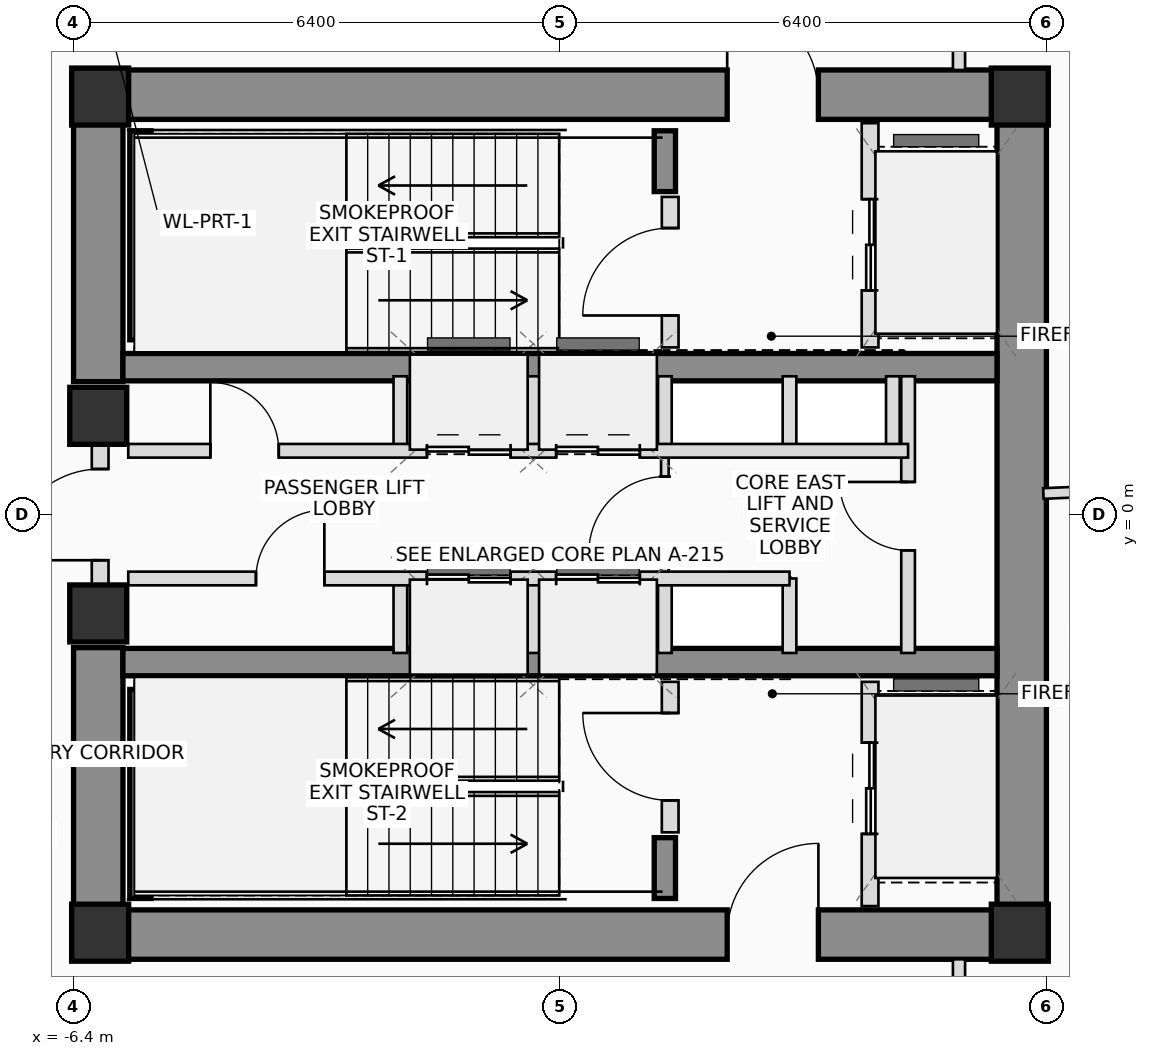
"""IFC4 building model, lengths in metres.
Left out: names, types, materials, properties, quantities, classifications, styles, units other than length and angle.
Written with IfcOpenShell. Run it as: python <this file> out.ifc"""

import sys

from ifc_helpers import new_model, si_unit, direction, frame, frame_2d, origin, origin_2d, place, context, subcontext, project, spatial, rectangle, extrude, source, transform, mapped, element, fill, save


model = new_model("IFC4")
c1 = context("Model", 3, precision=1e-05, world=origin(), true_north=direction((0.0, 1.0)))
c2 = subcontext(c1, "Body", "Model", "MODEL_VIEW")
j1 = project(units=[si_unit("LENGTHUNIT", "METRE"), si_unit("PLANEANGLEUNIT", "RADIAN")], contexts=[c1])
p1 = place(None, origin())
s1 = spatial("IfcSite", under=j1, at=p1, CompositionType="ELEMENT")
p2 = place(p1, origin())
s2 = spatial("IfcBuilding", under=s1, at=p2, CompositionType="ELEMENT")
p3 = place(p2, frame((0.0, 0.0, 162.2)))
s3 = spatial("IfcBuildingStorey", under=s2, at=p3, CompositionType="ELEMENT", Elevation=162.2)
m1 = source(origin(), c2, "Body", "SweptSolid", [
    extrude(rectangle(XDim=0.75, YDim=0.75, at=origin_2d()), origin(), (0.0, 0.0, 1.0), 3.45),
])
for number, where, z_axis, x_axis in (
    (1, (-6.05, -5.5, 0.0), (0.0, 0.0, 1.0), (1.0, 0.0, 0.0)),
    (2, (6.05, -5.5, 0.0), (0.0, 0.0, 1.0), (1.0, 0.0, 0.0)),
    (3, (6.05, 5.5, 0.0), (0.0, 0.0, 1.0), (1.0, 0.0, 0.0)),
    (4, (-6.05, 5.5, 0.0), (0.0, 0.0, 1.0), (1.0, 0.0, 0.0)),
):
    element("IfcColumn", number, at=place(p3, frame(where, z_axis=z_axis, x_axis=x_axis)), inside=s3, PredefinedType="COLUMN", context=c2, shape_type="MappedRepresentation", body=[
        mapped(m1, transform((0.0, 0.0, 0.0), scale=1.0)),
    ])
p4 = place(p3, frame((-6.4, 5.525, 0.0), z_axis=(0.0, 0.0, 1.0), x_axis=(1.0, 0.0, 0.0)))
e5 = element("IfcWall", 5, at=p4, inside=s3, PredefinedType="SHEAR", context=c2, shape_type="SweptSolid", body=[
    extrude(rectangle(XDim=12.8, YDim=0.65, at=frame_2d((6.4, 0.0))), origin(), (0.0, 0.0, 1.0), 3.45),
])
p5 = place(p4, frame((8.6, 0.0, 0.0)))
e6 = element("IfcOpeningElement", 6, at=p5, cuts=e5, PredefinedType="OPENING", context=c2, shape_type="SweptSolid", body=[
    extrude(rectangle(XDim=1.2, YDim=2.2, at=frame_2d((0.6, 1.1))), frame((0.0, 0.335, 0.0), z_axis=(0.0, -1.0, 0.0), x_axis=(1.0, 0.0, 0.0)), (0.0, 0.0, 1.0), 0.67),
])
p6 = place(p3, frame((-6.4, -5.525, 0.0), z_axis=(0.0, 0.0, 1.0), x_axis=(1.0, 0.0, 0.0)))
e7 = element("IfcWall", 7, at=p6, inside=s3, PredefinedType="SHEAR", context=c2, shape_type="SweptSolid", body=[
    extrude(rectangle(XDim=12.8, YDim=0.65, at=frame_2d((6.4, 0.0))), origin(), (0.0, 0.0, 1.0), 3.45),
])
p7 = place(p6, frame((8.6, 0.0, 0.0)))
e8 = element("IfcOpeningElement", 8, at=p7, cuts=e7, PredefinedType="OPENING", context=c2, shape_type="SweptSolid", body=[
    extrude(rectangle(XDim=1.2, YDim=2.2, at=frame_2d((0.6, 1.1))), frame((0.0, 0.335, 0.0), z_axis=(0.0, -1.0, 0.0), x_axis=(1.0, 0.0, 0.0)), (0.0, 0.0, 1.0), 0.67),
])
p8 = place(p3, frame((6.075, -5.2, 0.0), z_axis=(0.0, 0.0, 1.0), x_axis=(0.0, 1.0, 0.0)))
e9 = element("IfcWall", 9, at=p8, inside=s3, PredefinedType="SHEAR", context=c2, shape_type="SweptSolid", body=[
    extrude(rectangle(XDim=10.4, YDim=0.65, at=frame_2d((5.2, 0.0))), origin(), (0.0, 0.0, 1.0), 3.45),
])
for number, where, z_axis, x_axis in (
    (10, (-6.075, -5.2, 0.0), (0.0, 0.0, 1.0), (0.0, 1.0, 0.0)),
    (11, (-6.075, 1.75, 0.0), (0.0, 0.0, 1.0), (0.0, 1.0, 0.0)),
):
    element("IfcWall", number, at=place(p3, frame(where, z_axis=z_axis, x_axis=x_axis)), inside=s3, PredefinedType="SHEAR", context=c2, shape_type="SweptSolid", body=[
        extrude(rectangle(XDim=3.45, YDim=0.65, at=frame_2d((1.725, 0.0))), origin(), (0.0, 0.0, 1.0), 3.45),
    ])
for number, where, z_axis, x_axis in (
    (12, (-5.75, 1.94, 0.0), (0.0, 0.0, 1.0), (1.0, 0.0, 0.0)),
    (13, (-5.75, -1.94, 0.0), (0.0, 0.0, 1.0), (1.0, 0.0, 0.0)),
):
    element("IfcWall", number, at=place(p3, frame(where, z_axis=z_axis, x_axis=x_axis)), inside=s3, PredefinedType="SHEAR", context=c2, shape_type="SweptSolid", body=[
        extrude(rectangle(XDim=11.5, YDim=0.36, at=frame_2d((5.75, 0.0))), origin(), (0.0, 0.0, 1.0), 3.45),
    ])
p9 = place(p3, frame((-5.52, 2.3, 0.0), z_axis=(0.0, 0.0, 1.0), x_axis=(0.0, 1.0, 0.0)))
e14 = element("IfcWall", 14, at=p9, inside=s3, PredefinedType="SHEAR", context=c2, shape_type="SweptSolid", body=[
    extrude(rectangle(XDim=2.75, YDim=0.28, at=frame_2d((1.375, 0.0))), origin(), (0.0, 0.0, 1.0), 3.45),
])
p10 = place(p3, frame((1.38, 4.25, 0.0), z_axis=(0.0, 0.0, 1.0), x_axis=(0.0, 1.0, 0.0)))
e15 = element("IfcWall", 15, at=p10, inside=s3, PredefinedType="SHEAR", context=c2, shape_type="SweptSolid", body=[
    extrude(rectangle(XDim=0.8, YDim=0.28, at=frame_2d((0.4, 0.0))), origin(), (0.0, 0.0, 1.0), 3.45),
])
p11 = place(p3, frame((-5.52, -5.05, 0.0), z_axis=(0.0, 0.0, 1.0), x_axis=(0.0, 1.0, 0.0)))
e16 = element("IfcWall", 16, at=p11, inside=s3, PredefinedType="SHEAR", context=c2, shape_type="SweptSolid", body=[
    extrude(rectangle(XDim=2.75, YDim=0.28, at=frame_2d((1.375, 0.0))), origin(), (0.0, 0.0, 1.0), 3.45),
])
p12 = place(p3, frame((1.38, -5.05, 0.0), z_axis=(0.0, 0.0, 1.0), x_axis=(0.0, 1.0, 0.0)))
e17 = element("IfcWall", 17, at=p12, inside=s3, PredefinedType="SHEAR", context=c2, shape_type="SweptSolid", body=[
    extrude(rectangle(XDim=0.8, YDim=0.28, at=frame_2d((0.4, 0.0))), origin(), (0.0, 0.0, 1.0), 3.45),
])
for number, where, z_axis, x_axis in (
    (18, (-6.075, -1.3, 0.0), (0.0, 0.0, 1.0), (1.0, 0.0, 0.0)),
    (19, (-6.075, 1.3, 0.0), (0.0, 0.0, 1.0), (1.0, 0.0, 0.0)),
):
    element("IfcColumn", number, at=place(p3, frame(where, z_axis=z_axis, x_axis=x_axis)), inside=s3, PredefinedType="COLUMN", context=c2, shape_type="MappedRepresentation", body=[
        mapped(m1, transform((0.0, 0.0, 0.0), scale=1.0)),
    ])
p13 = place(p3, frame((-6.05, -0.95, 0.0), z_axis=(0.0, 0.0, 1.0), x_axis=(0.0, 1.0, 0.0)))
e20 = element("IfcWall", 20, at=p13, inside=s3, PredefinedType="PLUMBINGWALL", context=c2, shape_type="SweptSolid", body=[
    extrude(rectangle(XDim=1.9, YDim=0.22, at=frame_2d((0.95, 0.0))), origin(), (0.0, 0.0, 1.0), 2.23),
])
p14 = place(p13, frame((0.35, 0.0, 0.0)))
e21 = element("IfcOpeningElement", 21, at=p14, cuts=e20, PredefinedType="OPENING", context=c2, shape_type="SweptSolid", body=[
    extrude(rectangle(XDim=1.2, YDim=2.2, at=frame_2d((0.6, 1.1))), frame((0.0, 0.12, 0.0), z_axis=(0.0, -1.0, 0.0), x_axis=(1.0, 0.0, 0.0)), (0.0, 0.0, 1.0), 0.24),
])
p15 = place(p3, frame((1.45, 2.2, 0.0), z_axis=(0.0, 0.0, 1.0), x_axis=(0.0, 1.0, 0.0)))
e22 = element("IfcWall", 22, at=p15, inside=s3, PredefinedType="PLUMBINGWALL", context=c2, shape_type="SweptSolid", body=[
    extrude(rectangle(XDim=1.98, YDim=0.22, at=frame_2d((0.99, 0.0))), origin(), (0.0, 0.0, 1.0), 3.25),
])
p16 = place(p15, frame((0.42, 0.0, 0.0)))
e23 = element("IfcOpeningElement", 23, at=p16, cuts=e22, PredefinedType="OPENING", context=c2, shape_type="SweptSolid", body=[
    extrude(rectangle(XDim=1.15, YDim=2.15, at=frame_2d((0.575, 1.075))), frame((0.0, 0.12, 0.0), z_axis=(0.0, -1.0, 0.0), x_axis=(1.0, 0.0, 0.0)), (0.0, 0.0, 1.0), 0.24),
])
p17 = place(p3, frame((4.08, 2.2, 0.0), z_axis=(0.0, 0.0, 1.0), x_axis=(0.0, 1.0, 0.0)))
e24 = element("IfcWall", 24, at=p17, inside=s3, PredefinedType="PLUMBINGWALL", context=c2, shape_type="SweptSolid", body=[
    extrude(rectangle(XDim=2.95, YDim=0.22, at=frame_2d((1.475, 0.0))), origin(), (0.0, 0.0, 1.0), 3.25),
])
p18 = place(p17, frame((0.75, 0.0, 0.0)))
e25 = element("IfcOpeningElement", 25, at=p18, cuts=e24, PredefinedType="OPENING", context=c2, shape_type="SweptSolid", body=[
    extrude(rectangle(XDim=1.2, YDim=2.25, at=frame_2d((0.6, 1.125))), frame((0.0, 0.12, 0.0), z_axis=(0.0, -1.0, 0.0), x_axis=(1.0, 0.0, 0.0)), (0.0, 0.0, 1.0), 0.24),
])
p19 = place(p3, frame((1.45, -4.18, 0.0), z_axis=(0.0, 0.0, 1.0), x_axis=(0.0, 1.0, 0.0)))
e26 = element("IfcWall", 26, at=p19, inside=s3, PredefinedType="PLUMBINGWALL", context=c2, shape_type="SweptSolid", body=[
    extrude(rectangle(XDim=1.98, YDim=0.22, at=frame_2d((0.99, 0.0))), origin(), (0.0, 0.0, 1.0), 3.25),
])
p20 = place(p19, frame((0.42, 0.0, 0.0)))
e27 = element("IfcOpeningElement", 27, at=p20, cuts=e26, PredefinedType="OPENING", context=c2, shape_type="SweptSolid", body=[
    extrude(rectangle(XDim=1.15, YDim=2.15, at=frame_2d((0.575, 1.075))), frame((0.0, 0.12, 0.0), z_axis=(0.0, -1.0, 0.0), x_axis=(1.0, 0.0, 0.0)), (0.0, 0.0, 1.0), 0.24),
])
p21 = place(p3, frame((4.08, -5.15, 0.0), z_axis=(0.0, 0.0, 1.0), x_axis=(0.0, 1.0, 0.0)))
e28 = element("IfcWall", 28, at=p21, inside=s3, PredefinedType="PLUMBINGWALL", context=c2, shape_type="SweptSolid", body=[
    extrude(rectangle(XDim=2.95, YDim=0.22, at=frame_2d((1.475, 0.0))), origin(), (0.0, 0.0, 1.0), 3.25),
])
p22 = place(p21, frame((0.95, 0.0, 0.0)))
e29 = element("IfcOpeningElement", 29, at=p22, cuts=e28, PredefinedType="OPENING", context=c2, shape_type="SweptSolid", body=[
    extrude(rectangle(XDim=1.2, YDim=2.25, at=frame_2d((0.6, 1.125))), frame((0.0, 0.12, 0.0), z_axis=(0.0, -1.0, 0.0), x_axis=(1.0, 0.0, 0.0)), (0.0, 0.0, 1.0), 0.24),
])
p23 = place(p3, frame((1.38, -0.84, 0.0), z_axis=(0.0, 0.0, 1.0), x_axis=(0.0, 1.0, 0.0)))
e30 = element("IfcWall", 30, at=p23, inside=s3, PredefinedType="PARTITIONING", context=c2, shape_type="SweptSolid", body=[
    extrude(rectangle(XDim=1.68, YDim=0.1, at=frame_2d((0.84, 0.0))), origin(), (0.0, 0.0, 1.0), 3.25),
])
p24 = place(p23, frame((0.34, 0.0, 0.0)))
e31 = element("IfcOpeningElement", 31, at=p24, cuts=e30, PredefinedType="OPENING", context=c2, shape_type="SweptSolid", body=[
    extrude(rectangle(XDim=1.0, YDim=2.25, at=frame_2d((0.5, 1.125))), frame((0.0, 0.06, 0.0), z_axis=(0.0, -1.0, 0.0), x_axis=(1.0, 0.0, 0.0)), (0.0, 0.0, 1.0), 0.12),
])
for number, where, z_axis, x_axis in (
    (32, (-2.1, 0.84, 0.0), (0.0, 0.0, 1.0), (0.0, 1.0, 0.0)),
    (33, (-2.1, -1.82, 0.0), (0.0, 0.0, 1.0), (0.0, 1.0, 0.0)),
    (34, (-0.35, 0.84, 0.0), (0.0, 0.0, 1.0), (0.0, 1.0, 0.0)),
    (35, (-0.35, -1.82, 0.0), (0.0, 0.0, 1.0), (0.0, 1.0, 0.0)),
    (36, (1.38, 0.84, 0.0), (0.0, 0.0, 1.0), (0.0, 1.0, 0.0)),
    (37, (1.38, -1.82, 0.0), (0.0, 0.0, 1.0), (0.0, 1.0, 0.0)),
    (38, (3.02, 0.84, 0.0), (0.0, 0.0, 1.0), (0.0, 1.0, 0.0)),
    (39, (4.38, 0.84, 0.0), (0.0, 0.0, 1.0), (0.0, 1.0, 0.0)),
    (40, (3.02, -1.82, 0.0), (0.0, 0.0, 1.0), (0.0, 1.0, 0.0)),
):
    element("IfcWall", number, at=place(p3, frame(where, z_axis=z_axis, x_axis=x_axis)), inside=s3, PredefinedType="PLUMBINGWALL", context=c2, shape_type="SweptSolid", body=[
        extrude(rectangle(XDim=0.98, YDim=0.18, at=frame_2d((0.49, 0.0))), origin(), (0.0, 0.0, 1.0), 3.25),
    ])
p25 = place(p3, frame((4.58, -1.82, 0.0), z_axis=(0.0, 0.0, 1.0), x_axis=(0.0, 1.0, 0.0)))
e41 = element("IfcWall", 41, at=p25, inside=s3, PredefinedType="PLUMBINGWALL", context=c2, shape_type="SweptSolid", body=[
    extrude(rectangle(XDim=3.64, YDim=0.18, at=frame_2d((1.82, 0.0))), origin(), (0.0, 0.0, 1.0), 3.25),
])
p26 = place(p25, frame((1.35, 0.0, 0.0)))
e42 = element("IfcOpeningElement", 42, at=p26, cuts=e41, PredefinedType="OPENING", context=c2, shape_type="SweptSolid", body=[
    extrude(rectangle(XDim=0.9, YDim=2.05, at=frame_2d((0.45, 1.025))), frame((0.0, 0.1, 0.0), z_axis=(0.0, -1.0, 0.0), x_axis=(1.0, 0.0, 0.0)), (0.0, 0.0, 1.0), 0.2),
])
p27 = place(p3, frame((-5.68, 0.84, 0.0), z_axis=(0.0, 0.0, 1.0), x_axis=(1.0, 0.0, 0.0)))
e43 = element("IfcWall", 43, at=p27, inside=s3, PredefinedType="PLUMBINGWALL", context=c2, shape_type="SweptSolid", body=[
    extrude(rectangle(XDim=10.26, YDim=0.18, at=frame_2d((5.13, 0.0))), origin(), (0.0, 0.0, 1.0), 3.25),
])
p28 = place(p27, frame((1.08, 0.0, 0.0)))
e44 = element("IfcOpeningElement", 44, at=p28, cuts=e43, PredefinedType="OPENING", context=c2, shape_type="SweptSolid", body=[
    extrude(rectangle(XDim=0.9, YDim=2.05, at=frame_2d((0.45, 1.025))), frame((0.0, 0.1, 0.0), z_axis=(0.0, -1.0, 0.0), x_axis=(1.0, 0.0, 0.0)), (0.0, 0.0, 1.0), 0.2),
])
p29 = place(p27, frame((3.93, 0.0, 0.0)))
e45 = element("IfcOpeningElement", 45, at=p29, cuts=e43, PredefinedType="OPENING", context=c2, shape_type="SweptSolid", body=[
    extrude(rectangle(XDim=1.1, YDim=2.2, at=frame_2d((0.55, 1.1))), frame((0.0, 0.1, 0.0), z_axis=(0.0, -1.0, 0.0), x_axis=(1.0, 0.0, 0.0)), (0.0, 0.0, 1.0), 0.2),
])
p30 = place(p27, frame((5.63, 0.0, 0.0)))
e46 = element("IfcOpeningElement", 46, at=p30, cuts=e43, PredefinedType="OPENING", context=c2, shape_type="SweptSolid", body=[
    extrude(rectangle(XDim=1.1, YDim=2.2, at=frame_2d((0.55, 1.1))), frame((0.0, 0.1, 0.0), z_axis=(0.0, -1.0, 0.0), x_axis=(1.0, 0.0, 0.0)), (0.0, 0.0, 1.0), 0.2),
])
p31 = place(p3, frame((-5.68, -0.84, 0.0), z_axis=(0.0, 0.0, 1.0), x_axis=(1.0, 0.0, 0.0)))
e47 = element("IfcWall", 47, at=p31, inside=s3, PredefinedType="PLUMBINGWALL", context=c2, shape_type="SweptSolid", body=[
    extrude(rectangle(XDim=8.7, YDim=0.18, at=frame_2d((4.35, 0.0))), origin(), (0.0, 0.0, 1.0), 3.25),
])
p32 = place(p31, frame((1.68, 0.0, 0.0)))
e48 = element("IfcOpeningElement", 48, at=p32, cuts=e47, PredefinedType="OPENING", context=c2, shape_type="SweptSolid", body=[
    extrude(rectangle(XDim=0.9, YDim=2.05, at=frame_2d((0.45, 1.025))), frame((0.0, 0.1, 0.0), z_axis=(0.0, -1.0, 0.0), x_axis=(1.0, 0.0, 0.0)), (0.0, 0.0, 1.0), 0.2),
])
p33 = place(p31, frame((3.93, 0.0, 0.0)))
e49 = element("IfcOpeningElement", 49, at=p33, cuts=e47, PredefinedType="OPENING", context=c2, shape_type="SweptSolid", body=[
    extrude(rectangle(XDim=1.1, YDim=2.2, at=frame_2d((0.55, 1.1))), frame((0.0, 0.1, 0.0), z_axis=(0.0, -1.0, 0.0), x_axis=(1.0, 0.0, 0.0)), (0.0, 0.0, 1.0), 0.2),
])
p34 = place(p31, frame((5.63, 0.0, 0.0)))
e50 = element("IfcOpeningElement", 50, at=p34, cuts=e47, PredefinedType="OPENING", context=c2, shape_type="SweptSolid", body=[
    extrude(rectangle(XDim=1.1, YDim=2.2, at=frame_2d((0.55, 1.1))), frame((0.0, 0.1, 0.0), z_axis=(0.0, -1.0, 0.0), x_axis=(1.0, 0.0, 0.0)), (0.0, 0.0, 1.0), 0.2),
])
for number, where, z_axis, x_axis in (
    (51, (5.25, 7.5, 0.0), (0.0, 0.0, 1.0), (0.0, -1.0, 0.0)),
    (52, (5.25, -5.85, 0.0), (0.0, 0.0, 1.0), (0.0, -1.0, 0.0)),
):
    element("IfcWall", number, at=place(p3, frame(where, z_axis=z_axis, x_axis=x_axis)), inside=s3, PredefinedType="PARTITIONING", context=c2, shape_type="SweptSolid", body=[
        extrude(rectangle(XDim=1.65, YDim=0.16, at=frame_2d((0.825, 0.0))), origin(), (0.0, 0.0, 1.0), 3.25),
    ])
p35 = place(p3, frame((6.36, 0.278, 0.0), z_axis=(0.0, 0.0, 1.0), x_axis=(0.999047543566, 0.043634913719, 0.0)))
e53 = element("IfcWall", 53, at=p35, inside=s3, PredefinedType="PARTITIONING", context=c2, shape_type="SweptSolid", body=[
    extrude(rectangle(XDim=7.503, YDim=0.14, at=frame_2d((3.751, 0.0))), origin(), (0.0, 0.0, 1.0), 2.605),
])
p36 = place(p5, origin())
e54 = element("IfcDoor", 54, at=p36, inside=s3, OperationType="SINGLE_SWING_LEFT", PredefinedType="DOOR", context=c2, shape_type="SweptSolid", body=[
    extrude(rectangle(XDim=1.2, YDim=2.2, at=frame_2d((0.6, 1.1))), frame((0.0, 0.025, 0.0), z_axis=(0.0, -1.0, 0.0), x_axis=(1.0, 0.0, 0.0)), (0.0, 0.0, 1.0), 0.05),
])
fill(e6, e54)
p37 = place(p7, origin())
e55 = element("IfcDoor", 55, at=p37, inside=s3, OperationType="SINGLE_SWING_RIGHT", PredefinedType="DOOR", context=c2, shape_type="SweptSolid", body=[
    extrude(rectangle(XDim=1.2, YDim=2.2, at=frame_2d((0.6, 1.1))), frame((0.0, 0.025, 0.0), z_axis=(0.0, -1.0, 0.0), x_axis=(1.0, 0.0, 0.0)), (0.0, 0.0, 1.0), 0.05),
])
fill(e8, e55)
p38 = place(p14, origin())
e56 = element("IfcDoor", 56, at=p38, inside=s3, OperationType="SINGLE_SWING_LEFT", PredefinedType="DOOR", context=c2, shape_type="SweptSolid", body=[
    extrude(rectangle(XDim=1.2, YDim=2.2, at=frame_2d((0.6, 1.1))), frame((0.0, 0.025, 0.0), z_axis=(0.0, -1.0, 0.0), x_axis=(1.0, 0.0, 0.0)), (0.0, 0.0, 1.0), 0.05),
])
fill(e21, e56)
p39 = place(p16, origin())
e57 = element("IfcDoor", 57, at=p39, inside=s3, OperationType="SINGLE_SWING_LEFT", PredefinedType="DOOR", context=c2, shape_type="SweptSolid", body=[
    extrude(rectangle(XDim=1.15, YDim=2.15, at=frame_2d((0.575, 1.075))), frame((0.0, 0.025, 0.0), z_axis=(0.0, -1.0, 0.0), x_axis=(1.0, 0.0, 0.0)), (0.0, 0.0, 1.0), 0.05),
])
fill(e23, e57)
p40 = place(p18, origin())
e58 = element("IfcDoor", 58, at=p40, inside=s3, OperationType="DOUBLE_DOOR_SLIDING", PredefinedType="DOOR", context=c2, shape_type="SweptSolid", body=[
    extrude(rectangle(XDim=1.2, YDim=2.25, at=frame_2d((0.6, 1.125))), frame((0.0, 0.025, 0.0), z_axis=(0.0, -1.0, 0.0), x_axis=(1.0, 0.0, 0.0)), (0.0, 0.0, 1.0), 0.05),
])
fill(e25, e58)
p41 = place(p20, origin())
e59 = element("IfcDoor", 59, at=p41, inside=s3, OperationType="SINGLE_SWING_RIGHT", PredefinedType="DOOR", context=c2, shape_type="SweptSolid", body=[
    extrude(rectangle(XDim=1.15, YDim=2.15, at=frame_2d((0.575, 1.075))), frame((0.0, 0.025, 0.0), z_axis=(0.0, -1.0, 0.0), x_axis=(1.0, 0.0, 0.0)), (0.0, 0.0, 1.0), 0.05),
])
fill(e27, e59)
p42 = place(p22, origin())
e60 = element("IfcDoor", 60, at=p42, inside=s3, OperationType="DOUBLE_DOOR_SLIDING", PredefinedType="DOOR", context=c2, shape_type="SweptSolid", body=[
    extrude(rectangle(XDim=1.2, YDim=2.25, at=frame_2d((0.6, 1.125))), frame((0.0, 0.025, 0.0), z_axis=(0.0, -1.0, 0.0), x_axis=(1.0, 0.0, 0.0)), (0.0, 0.0, 1.0), 0.05),
])
fill(e29, e60)
p43 = place(p24, origin())
e61 = element("IfcDoor", 61, at=p43, inside=s3, OperationType="SINGLE_SWING_LEFT", PredefinedType="DOOR", context=c2, shape_type="SweptSolid", body=[
    extrude(rectangle(XDim=1.0, YDim=2.25, at=frame_2d((0.5, 1.125))), frame((0.0, 0.025, 0.0), z_axis=(0.0, -1.0, 0.0), x_axis=(1.0, 0.0, 0.0)), (0.0, 0.0, 1.0), 0.05),
])
fill(e31, e61)
p44 = place(p26, origin())
e62 = element("IfcDoor", 62, at=p44, inside=s3, OperationType="SINGLE_SWING_RIGHT", PredefinedType="DOOR", context=c2, shape_type="SweptSolid", body=[
    extrude(rectangle(XDim=0.9, YDim=2.05, at=frame_2d((0.45, 1.025))), frame((0.0, 0.025, 0.0), z_axis=(0.0, -1.0, 0.0), x_axis=(1.0, 0.0, 0.0)), (0.0, 0.0, 1.0), 0.05),
])
fill(e42, e62)
p45 = place(p28, origin())
e63 = element("IfcDoor", 63, at=p45, inside=s3, OperationType="SINGLE_SWING_LEFT", PredefinedType="DOOR", context=c2, shape_type="SweptSolid", body=[
    extrude(rectangle(XDim=0.9, YDim=2.05, at=frame_2d((0.45, 1.025))), frame((0.0, 0.025, 0.0), z_axis=(0.0, -1.0, 0.0), x_axis=(1.0, 0.0, 0.0)), (0.0, 0.0, 1.0), 0.05),
])
fill(e44, e63)
p46 = place(p29, origin())
e64 = element("IfcDoor", 64, at=p46, inside=s3, OperationType="DOUBLE_DOOR_SLIDING", PredefinedType="DOOR", context=c2, shape_type="SweptSolid", body=[
    extrude(rectangle(XDim=1.1, YDim=2.2, at=frame_2d((0.55, 1.1))), frame((0.0, 0.025, 0.0), z_axis=(0.0, -1.0, 0.0), x_axis=(1.0, 0.0, 0.0)), (0.0, 0.0, 1.0), 0.05),
])
fill(e45, e64)
p47 = place(p30, origin())
e65 = element("IfcDoor", 65, at=p47, inside=s3, OperationType="DOUBLE_DOOR_SLIDING", PredefinedType="DOOR", context=c2, shape_type="SweptSolid", body=[
    extrude(rectangle(XDim=1.1, YDim=2.2, at=frame_2d((0.55, 1.1))), frame((0.0, 0.025, 0.0), z_axis=(0.0, -1.0, 0.0), x_axis=(1.0, 0.0, 0.0)), (0.0, 0.0, 1.0), 0.05),
])
fill(e46, e65)
p48 = place(p32, origin())
e66 = element("IfcDoor", 66, at=p48, inside=s3, OperationType="SINGLE_SWING_RIGHT", PredefinedType="DOOR", context=c2, shape_type="SweptSolid", body=[
    extrude(rectangle(XDim=0.9, YDim=2.05, at=frame_2d((0.45, 1.025))), frame((0.0, 0.025, 0.0), z_axis=(0.0, -1.0, 0.0), x_axis=(1.0, 0.0, 0.0)), (0.0, 0.0, 1.0), 0.05),
])
fill(e48, e66)
p49 = place(p33, origin())
e67 = element("IfcDoor", 67, at=p49, inside=s3, OperationType="DOUBLE_DOOR_SLIDING", PredefinedType="DOOR", context=c2, shape_type="SweptSolid", body=[
    extrude(rectangle(XDim=1.1, YDim=2.2, at=frame_2d((0.55, 1.1))), frame((0.0, 0.025, 0.0), z_axis=(0.0, -1.0, 0.0), x_axis=(1.0, 0.0, 0.0)), (0.0, 0.0, 1.0), 0.05),
])
fill(e49, e67)
p50 = place(p34, origin())
e68 = element("IfcDoor", 68, at=p50, inside=s3, OperationType="DOUBLE_DOOR_SLIDING", PredefinedType="DOOR", context=c2, shape_type="SweptSolid", body=[
    extrude(rectangle(XDim=1.1, YDim=2.2, at=frame_2d((0.55, 1.1))), frame((0.0, 0.025, 0.0), z_axis=(0.0, -1.0, 0.0), x_axis=(1.0, 0.0, 0.0)), (0.0, 0.0, 1.0), 0.05),
])
fill(e50, e68)
save(model, sys.argv[1])
